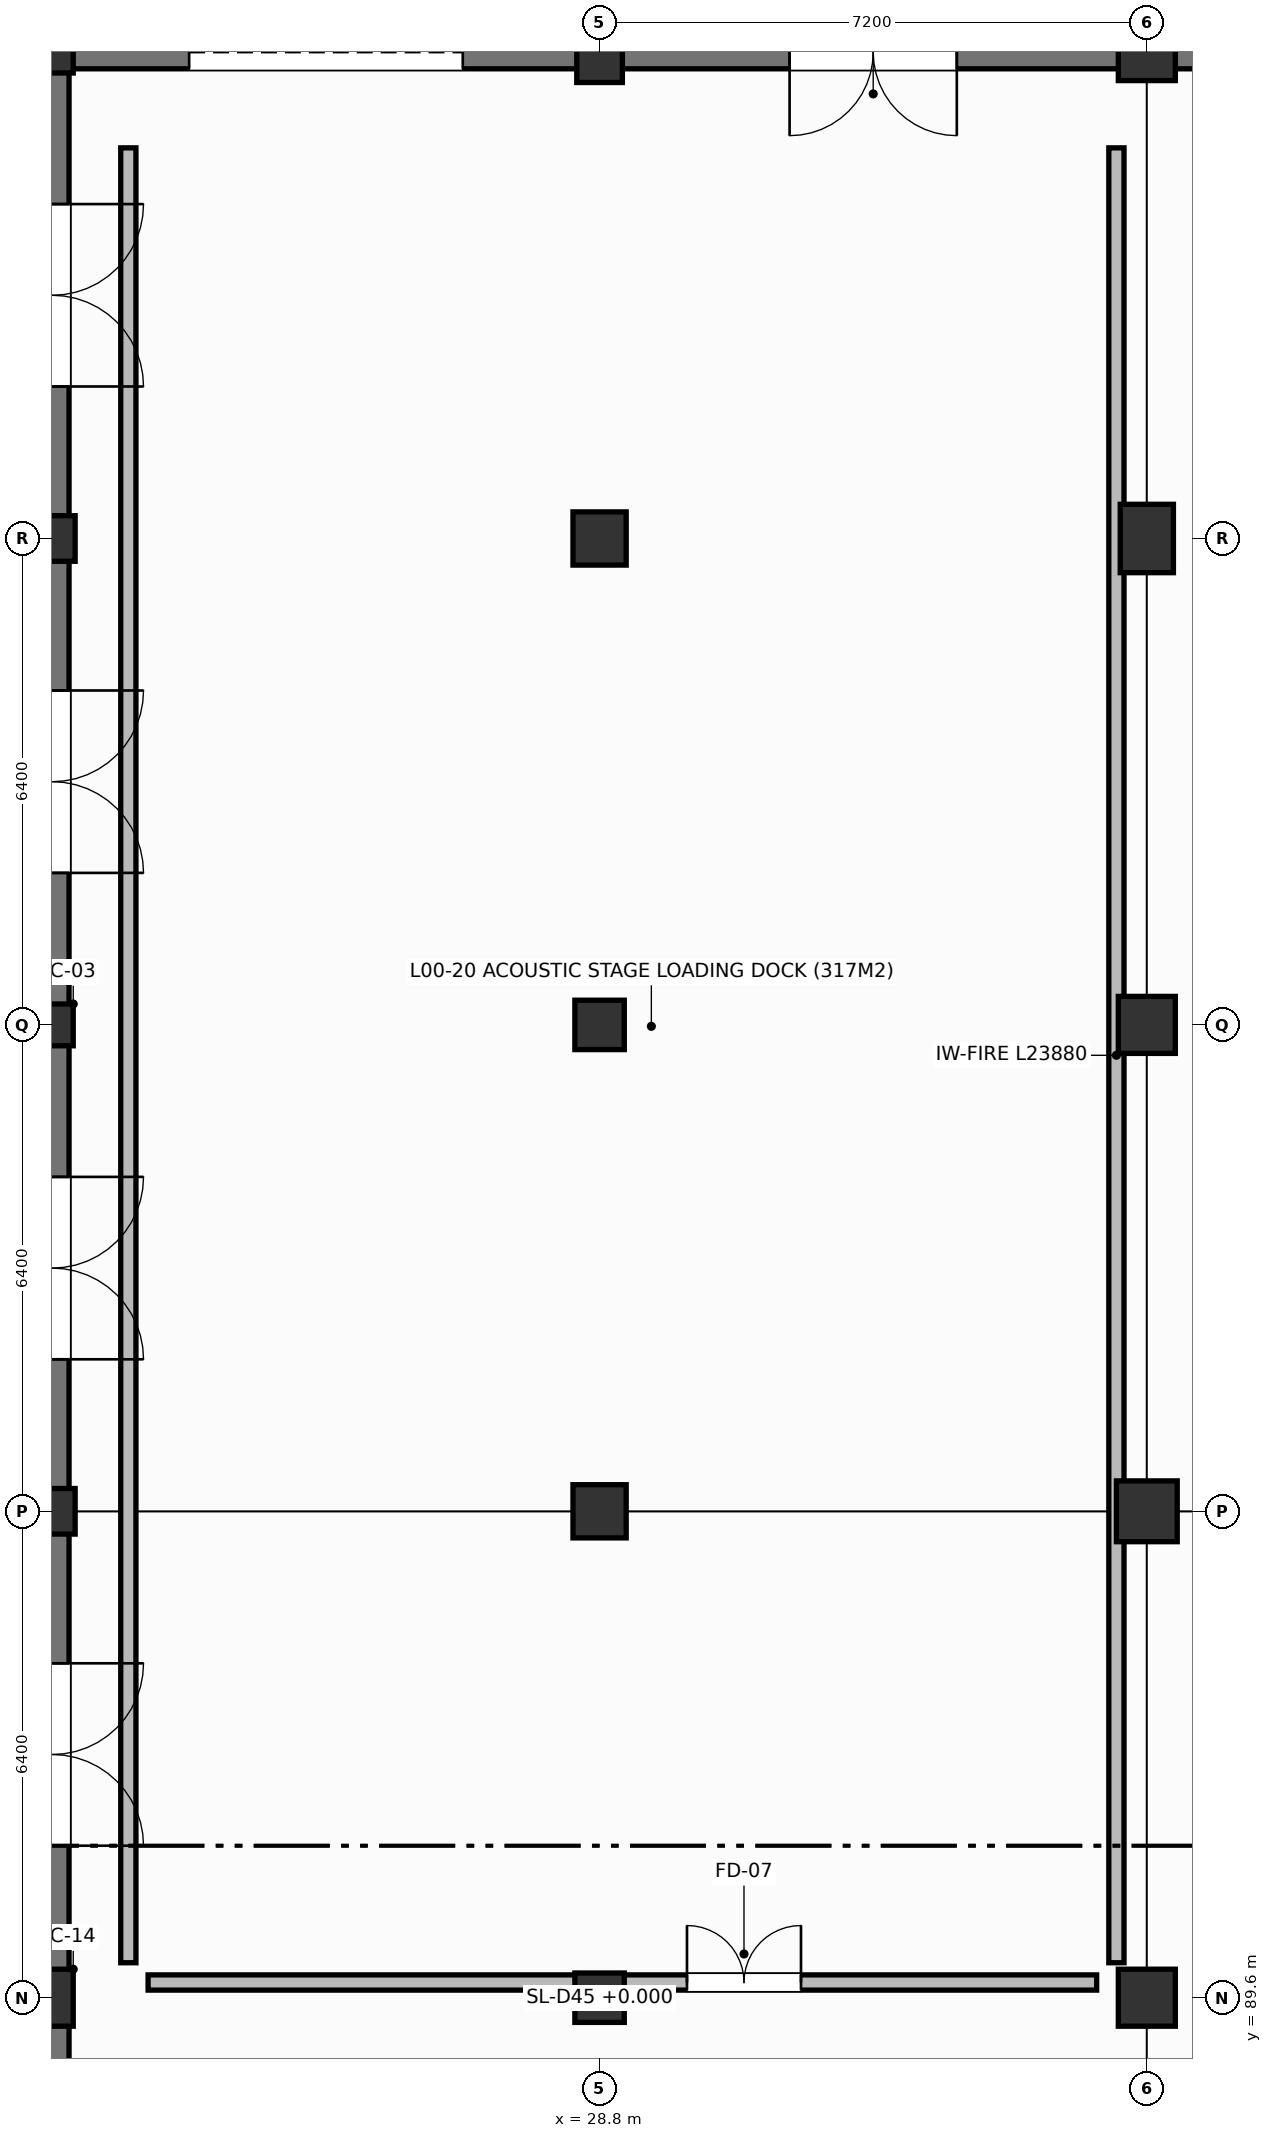
"""IFC4 building model, lengths in metres.
Left out: names, types, materials, properties, quantities, classifications, styles, units other than length and angle.
Written with IfcOpenShell. Run it as: python <this file> out.ifc"""

import sys

from ifc_helpers import new_model, si_unit, direction, frame, frame_2d, origin, origin_2d, place, context, subcontext, project, spatial, rectangle, extrude, element, fill, save


model = new_model("IFC4")
c1 = context("Model", 3, precision=1e-05, world=origin(), true_north=direction((0.0, 1.0)))
c2 = subcontext(c1, "Body", "Model", "MODEL_VIEW")
j1 = project(units=[si_unit("LENGTHUNIT", "METRE"), si_unit("PLANEANGLEUNIT", "RADIAN")], contexts=[c1])
p1 = place(None, origin())
s1 = spatial("IfcSite", under=j1, at=p1, CompositionType="ELEMENT")
p2 = place(p1, origin())
s2 = spatial("IfcBuilding", under=s1, at=p2, CompositionType="ELEMENT")
p3 = place(p2, origin())
s3 = spatial("IfcBuildingStorey", under=s2, at=p3, CompositionType="ELEMENT", Elevation=0.0)
p4 = place(p3, frame((21.6, 89.6, 0.0), z_axis=(0.0, 0.0, 1.0), x_axis=(1.0, 0.0, 0.0)))
e1 = element("IfcColumn", 1, at=p4, inside=s3, PredefinedType="COLUMN", context=c2, shape_type="SweptSolid", body=[
    extrude(rectangle(XDim=0.55, YDim=0.75, at=origin_2d()), origin(), (0.0, 0.0, 1.0), 4.8),
])
p5 = place(p3, frame((21.6, 96.0, 0.0), z_axis=(0.0, 0.0, 1.0), x_axis=(1.0, 0.0, 0.0)))
e2 = element("IfcColumn", 2, at=p5, inside=s3, PredefinedType="COLUMN", context=c2, shape_type="SweptSolid", body=[
    extrude(rectangle(XDim=0.6, YDim=0.6, at=origin_2d()), origin(), (0.0, 0.0, 1.0), 4.8),
])
p6 = place(p3, frame((21.6, 102.4, 0.0), z_axis=(0.0, 0.0, 1.0), x_axis=(1.0, 0.0, 0.0)))
e3 = element("IfcColumn", 3, at=p6, inside=s3, PredefinedType="COLUMN", context=c2, shape_type="SweptSolid", body=[
    extrude(rectangle(XDim=0.55, YDim=0.55, at=origin_2d()), origin(), (0.0, 0.0, 1.0), 4.8),
])
p7 = place(p3, frame((21.6, 108.8, 0.0), z_axis=(0.0, 0.0, 1.0), x_axis=(1.0, 0.0, 0.0)))
e4 = element("IfcColumn", 4, at=p7, inside=s3, PredefinedType="COLUMN", context=c2, shape_type="SweptSolid", body=[
    extrude(rectangle(XDim=0.6, YDim=0.6, at=origin_2d()), origin(), (0.0, 0.0, 1.0), 4.8),
])
p8 = place(p3, frame((21.6, 115.2, 0.0), z_axis=(0.0, 0.0, 1.0), x_axis=(1.0, 0.0, 0.0)))
e5 = element("IfcColumn", 5, at=p8, inside=s3, PredefinedType="COLUMN", context=c2, shape_type="SweptSolid", body=[
    extrude(rectangle(XDim=0.55, YDim=0.55, at=origin_2d()), origin(), (0.0, 0.0, 1.0), 4.8),
])
p9 = place(p3, frame((28.8, 89.6, 0.0), z_axis=(0.0, 0.0, 1.0), x_axis=(1.0, 0.0, 0.0)))
e6 = element("IfcColumn", 6, at=p9, inside=s3, PredefinedType="COLUMN", context=c2, shape_type="SweptSolid", body=[
    extrude(rectangle(XDim=0.65, YDim=0.65, at=origin_2d()), origin(), (0.0, 0.0, 1.0), 4.8),
])
p10 = place(p3, frame((28.8, 96.0, 0.0), z_axis=(0.0, 0.0, 1.0), x_axis=(1.0, 0.0, 0.0)))
e7 = element("IfcColumn", 7, at=p10, inside=s3, PredefinedType="COLUMN", context=c2, shape_type="SweptSolid", body=[
    extrude(rectangle(XDim=0.7, YDim=0.7, at=origin_2d()), origin(), (0.0, 0.0, 1.0), 4.8),
])
p11 = place(p3, frame((28.8, 102.4, 0.0), z_axis=(0.0, 0.0, 1.0), x_axis=(1.0, 0.0, 0.0)))
e8 = element("IfcColumn", 8, at=p11, inside=s3, PredefinedType="COLUMN", context=c2, shape_type="SweptSolid", body=[
    extrude(rectangle(XDim=0.65, YDim=0.65, at=origin_2d()), origin(), (0.0, 0.0, 1.0), 4.8),
])
p12 = place(p3, frame((28.8, 108.8, 0.0), z_axis=(0.0, 0.0, 1.0), x_axis=(1.0, 0.0, 0.0)))
e9 = element("IfcColumn", 9, at=p12, inside=s3, PredefinedType="COLUMN", context=c2, shape_type="SweptSolid", body=[
    extrude(rectangle(XDim=0.7, YDim=0.7, at=origin_2d()), origin(), (0.0, 0.0, 1.0), 4.8),
])
p13 = place(p3, frame((28.8, 115.2, 0.0), z_axis=(0.0, 0.0, 1.0), x_axis=(1.0, 0.0, 0.0)))
e10 = element("IfcColumn", 10, at=p13, inside=s3, PredefinedType="COLUMN", context=c2, shape_type="SweptSolid", body=[
    extrude(rectangle(XDim=0.6, YDim=0.8, at=origin_2d()), origin(), (0.0, 0.0, 1.0), 4.8),
])
p14 = place(p3, frame((36.0, 89.6, 0.0), z_axis=(0.0, 0.0, 1.0), x_axis=(1.0, 0.0, 0.0)))
e11 = element("IfcColumn", 11, at=p14, inside=s3, PredefinedType="COLUMN", context=c2, shape_type="SweptSolid", body=[
    extrude(rectangle(XDim=0.75, YDim=0.75, at=origin_2d()), origin(), (0.0, 0.0, 1.0), 4.8),
])
p15 = place(p3, frame((36.0, 96.0, 0.0), z_axis=(0.0, 0.0, 1.0), x_axis=(1.0, 0.0, 0.0)))
e12 = element("IfcColumn", 12, at=p15, inside=s3, PredefinedType="COLUMN", context=c2, shape_type="SweptSolid", body=[
    extrude(rectangle(XDim=0.8, YDim=0.8, at=origin_2d()), origin(), (0.0, 0.0, 1.0), 4.8),
])
p16 = place(p3, frame((36.0, 102.4, 0.0), z_axis=(0.0, 0.0, 1.0), x_axis=(1.0, 0.0, 0.0)))
e13 = element("IfcColumn", 13, at=p16, inside=s3, PredefinedType="COLUMN", context=c2, shape_type="SweptSolid", body=[
    extrude(rectangle(XDim=0.75, YDim=0.75, at=origin_2d()), origin(), (0.0, 0.0, 1.0), 4.8),
])
p17 = place(p3, frame((36.0, 108.8, 0.0), z_axis=(0.0, 0.0, 1.0), x_axis=(1.0, 0.0, 0.0)))
e14 = element("IfcColumn", 14, at=p17, inside=s3, PredefinedType="COLUMN", context=c2, shape_type="SweptSolid", body=[
    extrude(rectangle(XDim=0.7, YDim=0.9, at=origin_2d()), origin(), (0.0, 0.0, 1.0), 4.8),
])
p18 = place(p3, frame((36.0, 115.2, 0.0), z_axis=(0.0, 0.0, 1.0), x_axis=(1.0, 0.0, 0.0)))
e15 = element("IfcColumn", 15, at=p18, inside=s3, PredefinedType="COLUMN", context=c2, shape_type="SweptSolid", body=[
    extrude(rectangle(XDim=0.75, YDim=0.75, at=origin_2d()), origin(), (0.0, 0.0, 1.0), 4.8),
])
p19 = place(p3, frame((21.6, 83.2, 0.0), z_axis=(0.0, 0.0, 1.0), x_axis=(0.0, 1.0, 0.0)))
e16 = element("IfcWall", 16, at=p19, inside=s3, PredefinedType="STANDARD", context=c2, shape_type="SweptSolid", body=[
    extrude(rectangle(XDim=6.4, YDim=0.44, at=frame_2d((3.2, 0.0))), origin(), (0.0, 0.0, 1.0), 4.44),
])
p20 = place(p19, frame((2.0, 0.0, 0.0)))
e17 = element("IfcOpeningElement", 17, at=p20, cuts=e16, PredefinedType="OPENING", context=c2, shape_type="SweptSolid", body=[
    extrude(rectangle(XDim=2.4, YDim=2.45, at=frame_2d((1.2, 1.225))), frame((0.0, 0.23, 0.0), z_axis=(0.0, -1.0, 0.0), x_axis=(1.0, 0.0, 0.0)), (0.0, 0.0, 1.0), 0.46),
])
p21 = place(p3, frame((21.6, 89.6, 0.0), z_axis=(0.0, 0.0, 1.0), x_axis=(0.0, 1.0, 0.0)))
e18 = element("IfcWall", 18, at=p21, inside=s3, PredefinedType="STANDARD", context=c2, shape_type="SweptSolid", body=[
    extrude(rectangle(XDim=6.4, YDim=0.44, at=frame_2d((3.2, 0.0))), origin(), (0.0, 0.0, 1.0), 4.44),
])
p22 = place(p21, frame((2.0, 0.0, 0.0)))
e19 = element("IfcOpeningElement", 19, at=p22, cuts=e18, PredefinedType="OPENING", context=c2, shape_type="SweptSolid", body=[
    extrude(rectangle(XDim=2.4, YDim=2.45, at=frame_2d((1.2, 1.225))), frame((0.0, 0.23, 0.0), z_axis=(0.0, -1.0, 0.0), x_axis=(1.0, 0.0, 0.0)), (0.0, 0.0, 1.0), 0.46),
])
p23 = place(p3, frame((21.6, 96.0, 0.0), z_axis=(0.0, 0.0, 1.0), x_axis=(0.0, 1.0, 0.0)))
e20 = element("IfcWall", 20, at=p23, inside=s3, PredefinedType="STANDARD", context=c2, shape_type="SweptSolid", body=[
    extrude(rectangle(XDim=6.4, YDim=0.44, at=frame_2d((3.2, 0.0))), origin(), (0.0, 0.0, 1.0), 4.44),
])
p24 = place(p23, frame((2.0, 0.0, 0.0)))
e21 = element("IfcOpeningElement", 21, at=p24, cuts=e20, PredefinedType="OPENING", context=c2, shape_type="SweptSolid", body=[
    extrude(rectangle(XDim=2.4, YDim=2.45, at=frame_2d((1.2, 1.225))), frame((0.0, 0.23, 0.0), z_axis=(0.0, -1.0, 0.0), x_axis=(1.0, 0.0, 0.0)), (0.0, 0.0, 1.0), 0.46),
])
p25 = place(p3, frame((21.6, 102.4, 0.0), z_axis=(0.0, 0.0, 1.0), x_axis=(0.0, 1.0, 0.0)))
e22 = element("IfcWall", 22, at=p25, inside=s3, PredefinedType="STANDARD", context=c2, shape_type="SweptSolid", body=[
    extrude(rectangle(XDim=6.4, YDim=0.44, at=frame_2d((3.2, 0.0))), origin(), (0.0, 0.0, 1.0), 4.44),
])
p26 = place(p25, frame((2.0, 0.0, 0.0)))
e23 = element("IfcOpeningElement", 23, at=p26, cuts=e22, PredefinedType="OPENING", context=c2, shape_type="SweptSolid", body=[
    extrude(rectangle(XDim=2.4, YDim=2.45, at=frame_2d((1.2, 1.225))), frame((0.0, 0.23, 0.0), z_axis=(0.0, -1.0, 0.0), x_axis=(1.0, 0.0, 0.0)), (0.0, 0.0, 1.0), 0.46),
])
p27 = place(p3, frame((21.6, 108.8, 0.0), z_axis=(0.0, 0.0, 1.0), x_axis=(0.0, 1.0, 0.0)))
e24 = element("IfcWall", 24, at=p27, inside=s3, PredefinedType="STANDARD", context=c2, shape_type="SweptSolid", body=[
    extrude(rectangle(XDim=6.4, YDim=0.44, at=frame_2d((3.2, 0.0))), origin(), (0.0, 0.0, 1.0), 4.44),
])
p28 = place(p27, frame((2.0, 0.0, 0.0)))
e25 = element("IfcOpeningElement", 25, at=p28, cuts=e24, PredefinedType="OPENING", context=c2, shape_type="SweptSolid", body=[
    extrude(rectangle(XDim=2.4, YDim=2.45, at=frame_2d((1.2, 1.225))), frame((0.0, 0.23, 0.0), z_axis=(0.0, -1.0, 0.0), x_axis=(1.0, 0.0, 0.0)), (0.0, 0.0, 1.0), 0.46),
])
p29 = place(p3, frame((21.6, 115.2, 0.0), z_axis=(0.0, 0.0, 1.0), x_axis=(1.0, 0.0, 0.0)))
e26 = element("IfcWall", 26, at=p29, inside=s3, PredefinedType="STANDARD", context=c2, shape_type="SweptSolid", body=[
    extrude(rectangle(XDim=7.2, YDim=0.44, at=frame_2d((3.6, 0.0))), origin(), (0.0, 0.0, 1.0), 4.44),
])
p30 = place(p29, frame((1.8, 0.0, 0.0)))
e27 = element("IfcOpeningElement", 27, at=p30, cuts=e26, PredefinedType="OPENING", context=c2, shape_type="SweptSolid", body=[
    extrude(rectangle(XDim=3.6, YDim=3.1, at=frame_2d((1.8, 1.55))), frame((0.0, 0.23, 0.0), z_axis=(0.0, -1.0, 0.0), x_axis=(1.0, 0.0, 0.0)), (0.0, 0.0, 1.0), 0.46),
])
p31 = place(p3, frame((28.8, 115.2, 0.0), z_axis=(0.0, 0.0, 1.0), x_axis=(1.0, 0.0, 0.0)))
e28 = element("IfcWall", 28, at=p31, inside=s3, PredefinedType="STANDARD", context=c2, shape_type="SweptSolid", body=[
    extrude(rectangle(XDim=7.2, YDim=0.44, at=frame_2d((3.6, 0.0))), origin(), (0.0, 0.0, 1.0), 4.44),
])
p32 = place(p31, frame((2.5, 0.0, 0.0)))
e29 = element("IfcOpeningElement", 29, at=p32, cuts=e28, PredefinedType="OPENING", context=c2, shape_type="SweptSolid", body=[
    extrude(rectangle(XDim=2.2, YDim=2.45, at=frame_2d((1.1, 1.225))), frame((0.0, 0.23, 0.0), z_axis=(0.0, -1.0, 0.0), x_axis=(1.0, 0.0, 0.0)), (0.0, 0.0, 1.0), 0.46),
])
p33 = place(p3, frame((36.0, 115.2, 0.0), z_axis=(0.0, 0.0, 1.0), x_axis=(1.0, 0.0, 0.0)))
e30 = element("IfcWall", 30, at=p33, inside=s3, PredefinedType="STANDARD", context=c2, shape_type="SweptSolid", body=[
    extrude(rectangle(XDim=7.2, YDim=0.44, at=frame_2d((3.6, 0.0))), origin(), (0.0, 0.0, 1.0), 4.44),
])
p34 = place(p33, frame((2.5, 0.0, 0.0)))
e31 = element("IfcOpeningElement", 31, at=p34, cuts=e30, PredefinedType="OPENING", context=c2, shape_type="SweptSolid", body=[
    extrude(rectangle(XDim=2.2, YDim=2.45, at=frame_2d((1.1, 1.225))), frame((0.0, 0.23, 0.0), z_axis=(0.0, -1.0, 0.0), x_axis=(1.0, 0.0, 0.0)), (0.0, 0.0, 1.0), 0.46),
])
p35 = place(p3, frame((22.86, 89.8, 0.0), z_axis=(0.0, 0.0, 1.0), x_axis=(1.0, 0.0, 0.0)))
e32 = element("IfcWall", 32, at=p35, inside=s3, PredefinedType="PARTITIONING", context=c2, shape_type="SweptSolid", body=[
    extrude(rectangle(XDim=12.48, YDim=0.2, at=frame_2d((6.24, 0.0))), origin(), (0.0, 0.0, 1.0), 3.515),
])
p36 = place(p35, frame((7.09, 0.0, 0.0)))
e33 = element("IfcOpeningElement", 33, at=p36, cuts=e32, PredefinedType="OPENING", context=c2, shape_type="SweptSolid", body=[
    extrude(rectangle(XDim=1.5, YDim=2.2, at=frame_2d((0.75, 1.1))), frame((0.0, 0.11, 0.0), z_axis=(0.0, -1.0, 0.0), x_axis=(1.0, 0.0, 0.0)), (0.0, 0.0, 1.0), 0.22),
])
p37 = place(p3, frame((35.6, 90.06, 0.0), z_axis=(0.0, 0.0, 1.0), x_axis=(0.0, 1.0, 0.0)))
e34 = element("IfcWall", 34, at=p37, inside=s3, PredefinedType="PARTITIONING", context=c2, shape_type="SweptSolid", body=[
    extrude(rectangle(XDim=23.88, YDim=0.2, at=frame_2d((11.94, 0.0))), origin(), (0.0, 0.0, 1.0), 3.215),
])
p38 = place(p3, frame((22.6, 113.94, 0.0), z_axis=(0.0, 0.0, 1.0), x_axis=(0.0, -1.0, 0.0)))
e35 = element("IfcWall", 35, at=p38, inside=s3, PredefinedType="PARTITIONING", context=c2, shape_type="SweptSolid", body=[
    extrude(rectangle(XDim=23.88, YDim=0.2, at=frame_2d((11.94, 0.0))), origin(), (0.0, 0.0, 1.0), 4.44),
])
p39 = place(p30, origin())
e36 = element("IfcDoor", 36, at=p39, inside=s3, OperationType="ROLLINGUP", PredefinedType="DOOR", context=c2, shape_type="SweptSolid", body=[
    extrude(rectangle(XDim=3.6, YDim=3.1, at=frame_2d((1.8, 1.55))), frame((0.0, 0.025, 0.0), z_axis=(0.0, -1.0, 0.0), x_axis=(1.0, 0.0, 0.0)), (0.0, 0.0, 1.0), 0.05),
])
fill(e27, e36)
p40 = place(p22, frame((2.4, 0.0, 0.0), z_axis=(0.0, 0.0, 1.0), x_axis=(-1.0, 0.0, 0.0)))
e37 = element("IfcDoor", 37, at=p40, inside=s3, OperationType="DOUBLE_DOOR_SINGLE_SWING", PredefinedType="DOOR", context=c2, shape_type="SweptSolid", body=[
    extrude(rectangle(XDim=2.4, YDim=2.45, at=frame_2d((1.2, 1.225))), frame((0.0, 0.025, 0.0), z_axis=(0.0, -1.0, 0.0), x_axis=(1.0, 0.0, 0.0)), (0.0, 0.0, 1.0), 0.05),
])
fill(e19, e37)
p41 = place(p24, frame((2.4, 0.0, 0.0), z_axis=(0.0, 0.0, 1.0), x_axis=(-1.0, 0.0, 0.0)))
e38 = element("IfcDoor", 38, at=p41, inside=s3, OperationType="DOUBLE_DOOR_SINGLE_SWING", PredefinedType="DOOR", context=c2, shape_type="SweptSolid", body=[
    extrude(rectangle(XDim=2.4, YDim=2.45, at=frame_2d((1.2, 1.225))), frame((0.0, 0.025, 0.0), z_axis=(0.0, -1.0, 0.0), x_axis=(1.0, 0.0, 0.0)), (0.0, 0.0, 1.0), 0.05),
])
fill(e21, e38)
p42 = place(p26, frame((2.4, 0.0, 0.0), z_axis=(0.0, 0.0, 1.0), x_axis=(-1.0, 0.0, 0.0)))
e39 = element("IfcDoor", 39, at=p42, inside=s3, OperationType="DOUBLE_DOOR_SINGLE_SWING", PredefinedType="DOOR", context=c2, shape_type="SweptSolid", body=[
    extrude(rectangle(XDim=2.4, YDim=2.45, at=frame_2d((1.2, 1.225))), frame((0.0, 0.025, 0.0), z_axis=(0.0, -1.0, 0.0), x_axis=(1.0, 0.0, 0.0)), (0.0, 0.0, 1.0), 0.05),
])
fill(e23, e39)
p43 = place(p28, frame((2.4, 0.0, 0.0), z_axis=(0.0, 0.0, 1.0), x_axis=(-1.0, 0.0, 0.0)))
e40 = element("IfcDoor", 40, at=p43, inside=s3, OperationType="DOUBLE_DOOR_SINGLE_SWING", PredefinedType="DOOR", context=c2, shape_type="SweptSolid", body=[
    extrude(rectangle(XDim=2.4, YDim=2.45, at=frame_2d((1.2, 1.225))), frame((0.0, 0.025, 0.0), z_axis=(0.0, -1.0, 0.0), x_axis=(1.0, 0.0, 0.0)), (0.0, 0.0, 1.0), 0.05),
])
fill(e25, e40)
p44 = place(p32, frame((2.2, 0.0, 0.0), z_axis=(0.0, 0.0, 1.0), x_axis=(-1.0, 0.0, 0.0)))
e41 = element("IfcDoor", 41, at=p44, inside=s3, OperationType="DOUBLE_DOOR_SINGLE_SWING", PredefinedType="DOOR", context=c2, shape_type="SweptSolid", body=[
    extrude(rectangle(XDim=2.2, YDim=2.45, at=frame_2d((1.1, 1.225))), frame((0.0, 0.025, 0.0), z_axis=(0.0, -1.0, 0.0), x_axis=(1.0, 0.0, 0.0)), (0.0, 0.0, 1.0), 0.05),
])
fill(e29, e41)
p45 = place(p36, origin())
e42 = element("IfcDoor", 42, at=p45, inside=s3, OperationType="DOUBLE_DOOR_SINGLE_SWING", PredefinedType="DOOR", context=c2, shape_type="SweptSolid", body=[
    extrude(rectangle(XDim=1.5, YDim=2.2, at=frame_2d((0.75, 1.1))), frame((0.0, 0.025, 0.0), z_axis=(0.0, -1.0, 0.0), x_axis=(1.0, 0.0, 0.0)), (0.0, 0.0, 1.0), 0.05),
])
fill(e33, e42)
save(model, sys.argv[1])
